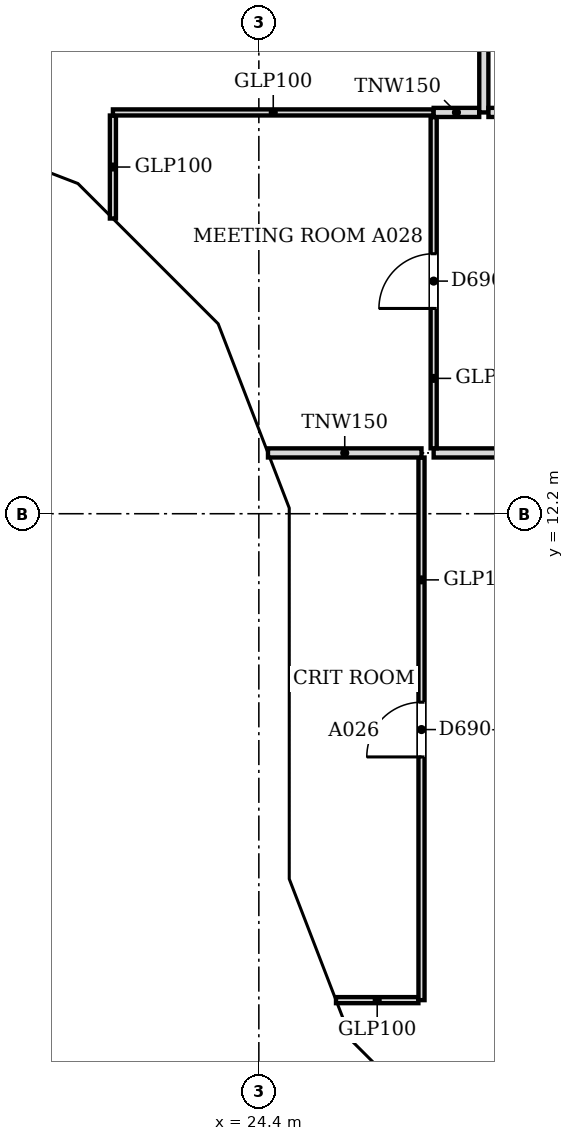
"""IFC4 building model, lengths in metres.
Left out: names, types, materials, properties, quantities, classifications, styles, units other than length and angle.
Written with IfcOpenShell. Run it as: python <this file> out.ifc"""

import sys

from ifc_helpers import new_model, si_unit, direction, frame, frame_2d, origin, place, context, subcontext, project, spatial, polyline, rectangle, outline, extrude, faceted_brep, source, transform, mapped, element, fill, save


model = new_model("IFC4")
c1 = context("Model", 3, precision=1e-05, world=origin(), true_north=direction((0.0, 1.0)))
c2 = subcontext(c1, "Body", "Model", "MODEL_VIEW")
j1 = project(units=[si_unit("LENGTHUNIT", "METRE"), si_unit("PLANEANGLEUNIT", "RADIAN")], contexts=[c1])
p1 = place(None, origin())
s1 = spatial("IfcSite", under=j1, at=p1, CompositionType="ELEMENT")
p2 = place(p1, origin())
s2 = spatial("IfcBuilding", under=s1, at=p2, CompositionType="ELEMENT")
p3 = place(p2, frame((0.0, 0.0, 21.3)))
s3 = spatial("IfcBuildingStorey", under=s2, at=p3, CompositionType="ELEMENT", Elevation=21.3)
m1 = source(origin(), c2, "Body", "Brep", [
    faceted_brep([(3.096, -0.25, 8.925), (0.047, -0.25, 4.566), (0.047, -0.25, 4.434), (3.096, -0.25, 0.075), (0.0, 0.25, 4.5), (3.149, 0.25, 9.0), (3.202, 0.25, 8.925), (3.202, 0.25, 0.075), (3.149, 0.25, 0.0), (3.149, -0.0, 0.0), (3.149, -0.0, 9.0), (0.0, 0.0, 4.5)], [[[0, 1, 2, 3]], [[4, 5, 6, 7, 8]], [[8, 7, 9]], [[6, 5, 10]], [[5, 4, 11, 1, 0, 10]], [[4, 8, 9, 3, 2, 11]], [[11, 2, 1]], [[3, 9, 7, 6, 10, 0]]]),
])
p4 = place(p3, frame((18.346, 18.55, -4.5), z_axis=(0.0, 0.0, 1.0), x_axis=(0.932985567668, -0.359913782069, 0.0)))
e1 = element("IfcWall", 1, at=p4, inside=s3, PredefinedType="SOLIDWALL", context=c2, shape_type="MappedRepresentation", body=[
    mapped(m1, transform((0.0, 0.0, 0.0), scale=1.0)),
])
m2 = source(origin(), c2, "Body", "SweptSolid", [
    extrude(outline(polyline([(2.949, 8.278), (0.305, 4.5), (2.949, 0.722), (2.949, 8.278)])), frame((0.0, 0.26, 0.0), z_axis=(0.0, -1.0, 0.0), x_axis=(1.0, 0.0, 0.0)), (0.0, 0.0, 1.0), 0.52),
])
p5 = place(p4, origin())
e2 = element("IfcOpeningElement", 2, at=p5, cuts=e1, PredefinedType="OPENING", context=c2, shape_type="MappedRepresentation", body=[
    mapped(m2, transform((0.0, 0.0, 0.0), scale=1.0)),
])
m3 = source(origin(), c2, "Body", "Brep", [
    faceted_brep([(0.106, -0.25, 0.075), (3.156, -0.25, 4.425), (3.156, -0.25, 4.575), (0.106, -0.25, 8.925), (0.0, 0.25, 8.924), (0.053, 0.25, 9.0), (3.209, 0.25, 4.5), (0.053, 0.25, 0.0), (0.0, 0.25, 0.076), (3.209, -0.0, 4.5), (0.053, 0.0, 0.0), (0.053, 0.0, 9.0)], [[[0, 1, 2, 3]], [[4, 5, 6, 7, 8]], [[7, 6, 9, 1, 0, 10]], [[6, 5, 11, 3, 2, 9]], [[5, 4, 11]], [[8, 7, 10]], [[8, 10, 0, 3, 11, 4]], [[1, 9, 2]]]),
])
p6 = place(p3, frame((21.248, 17.454, -4.5), z_axis=(0.0, 0.0, 1.0), x_axis=(0.707106781187, -0.707106781187, 0.0)))
e3 = element("IfcWall", 3, at=p6, inside=s3, PredefinedType="SOLIDWALL", context=c2, shape_type="MappedRepresentation", body=[
    mapped(m3, transform((0.0, 0.0, 0.0), scale=1.0)),
])
m4 = source(origin(), c2, "Body", "SweptSolid", [
    extrude(outline(polyline([(0.253, 0.72), (2.904, 4.5), (0.253, 8.279), (0.253, 0.72)])), frame((0.0, 0.26, 0.0), z_axis=(0.0, -1.0, 0.0), x_axis=(1.0, 0.0, 0.0)), (0.0, 0.0, 1.0), 0.52),
])
p7 = place(p6, origin())
e4 = element("IfcOpeningElement", 4, at=p7, cuts=e3, PredefinedType="OPENING", context=c2, shape_type="MappedRepresentation", body=[
    mapped(m4, transform((0.0, 0.0, 0.0), scale=1.0)),
])
m5 = source(origin(), c2, "Body", "Brep", [
    faceted_brep([(3.103, -0.25, 8.934), (0.053, -0.25, 4.576), (0.053, -0.25, 4.424), (3.103, -0.25, 0.066), (0.0, 0.25, 4.5), (3.149, 0.25, 9.0), (3.196, 0.25, 8.932), (3.196, 0.25, 0.068), (3.149, 0.25, 0.0), (3.149, -0.0, 0.0), (3.149, -0.0, 9.0), (0.0, 0.0, 4.5)], [[[0, 1, 2, 3]], [[4, 5, 6, 7, 8]], [[8, 7, 9]], [[6, 5, 10]], [[5, 4, 11, 1, 0, 10]], [[4, 8, 9, 3, 2, 11]], [[11, 2, 1]], [[3, 9, 7, 6, 10, 0]]]),
])
p8 = place(p3, frame((23.517, 15.185, -4.5), z_axis=(0.0, 0.0, 1.0), x_axis=(0.359864468756, -0.933004589553, 0.0)))
e5 = element("IfcWall", 5, at=p8, inside=s3, PredefinedType="SOLIDWALL", context=c2, shape_type="MappedRepresentation", body=[
    mapped(m5, transform((0.0, 0.0, 0.0), scale=1.0)),
])
p9 = place(p8, origin())
e6 = element("IfcOpeningElement", 6, at=p9, cuts=e5, PredefinedType="OPENING", context=c2, shape_type="MappedRepresentation", body=[
    mapped(m2, transform((0.0, 0.0, 0.0), scale=1.0)),
])
m6 = source(origin(), c2, "Body", "Brep", [
    faceted_brep([(0.093, -0.25, 0.068), (3.143, -0.25, 4.5), (0.093, -0.25, 8.932), (0.0, 0.25, 8.934), (0.047, 0.25, 9.0), (3.143, 0.25, 4.5), (0.047, 0.25, 0.0), (0.0, 0.25, 0.066), (0.047, 0.0, 0.0), (0.047, 0.0, 9.0)], [[[0, 1, 2]], [[3, 4, 5, 6, 7]], [[6, 5, 1, 0, 8]], [[5, 4, 9, 2, 1]], [[4, 3, 9]], [[7, 6, 8]], [[7, 8, 0, 2, 9, 3]]]),
])
p10 = place(p3, frame((24.65, 12.293, -4.5), z_axis=(0.0, 0.0, 1.0), x_axis=(0.0, -1.0, 0.0)))
e7 = element("IfcWall", 7, at=p10, inside=s3, PredefinedType="SOLIDWALL", context=c2, shape_type="MappedRepresentation", body=[
    mapped(m6, transform((0.0, 0.0, 0.0), scale=1.0)),
])
m7 = source(origin(), c2, "Body", "SweptSolid", [
    extrude(outline(polyline([(0.247, 0.732), (2.84, 4.5), (0.247, 8.268), (0.247, 0.732)])), frame((0.0, 0.26, 0.0), z_axis=(0.0, -1.0, 0.0), x_axis=(1.0, 0.0, 0.0)), (0.0, 0.0, 1.0), 0.52),
])
p11 = place(p10, origin())
e8 = element("IfcOpeningElement", 8, at=p11, cuts=e7, PredefinedType="OPENING", context=c2, shape_type="MappedRepresentation", body=[
    mapped(m7, transform((0.0, 0.0, 0.0), scale=1.0)),
])
m8 = source(origin(), c2, "Body", "Brep", [
    faceted_brep([(3.003, -0.25, 0.0), (3.05, -0.25, 0.071), (3.05, -0.25, 8.929), (3.003, -0.25, 9.0), (0.0, -0.25, 4.5), (0.0, 0.25, 4.5), (2.957, 0.25, 8.93), (2.957, 0.25, 0.07), (3.003, 0.0, 0.0), (3.003, 0.0, 9.0)], [[[0, 1, 2, 3, 4]], [[5, 6, 7]], [[1, 0, 8]], [[9, 3, 2]], [[6, 5, 4, 3, 9]], [[5, 7, 8, 0, 4]], [[1, 8, 7, 6, 9, 2]]]),
])
p12 = place(p3, frame((24.65, 9.15, -4.5), z_axis=(0.0, 0.0, 1.0), x_axis=(0.0, -1.0, 0.0)))
e9 = element("IfcWall", 9, at=p12, inside=s3, PredefinedType="SOLIDWALL", context=c2, shape_type="MappedRepresentation", body=[
    mapped(m8, transform((0.0, 0.0, 0.0), scale=1.0)),
])
m9 = source(origin(), c2, "Body", "SweptSolid", [
    extrude(outline(polyline([(2.803, 8.25), (0.301, 4.5), (2.803, 0.75), (2.803, 8.25)])), frame((0.0, 0.26, 0.0), z_axis=(0.0, -1.0, 0.0), x_axis=(1.0, 0.0, 0.0)), (0.0, 0.0, 1.0), 0.52),
])
p13 = place(p12, origin())
e10 = element("IfcOpeningElement", 10, at=p13, cuts=e9, PredefinedType="OPENING", context=c2, shape_type="MappedRepresentation", body=[
    mapped(m9, transform((0.0, 0.0, 0.0), scale=1.0)),
])
m10 = source(origin(), c2, "Body", "Brep", [
    faceted_brep([(0.047, -0.25, 0.0), (2.997, -0.25, 4.5), (0.047, -0.25, 9.0), (0.0, -0.25, 8.93), (0.0, -0.25, 0.07), (0.093, 0.25, 8.929), (2.944, 0.25, 4.581), (2.944, 0.25, 4.419), (0.093, 0.25, 0.071), (2.997, 0.0, 4.5), (0.047, 0.0, 0.0), (0.047, 0.0, 9.0)], [[[0, 1, 2, 3, 4]], [[5, 6, 7, 8]], [[8, 7, 9, 1, 0, 10]], [[6, 5, 11, 2, 1, 9]], [[3, 2, 11]], [[10, 0, 4]], [[8, 10, 4, 3, 11, 5]], [[9, 7, 6]]]),
])
p14 = place(p3, frame((24.633, 6.19, -4.5), z_axis=(0.0, 0.0, 1.0), x_axis=(0.359901446078, -0.932990326376, 0.0)))
e11 = element("IfcWall", 11, at=p14, inside=s3, PredefinedType="SOLIDWALL", context=c2, shape_type="MappedRepresentation", body=[
    mapped(m10, transform((0.0, 0.0, 0.0), scale=1.0)),
])
m11 = source(origin(), c2, "Body", "SweptSolid", [
    extrude(outline(polyline([(0.247, 0.761), (2.698, 4.5), (0.247, 8.239), (0.247, 0.761)])), frame((0.0, 0.26, 0.0), z_axis=(0.0, -1.0, 0.0), x_axis=(1.0, 0.0, 0.0)), (0.0, 0.0, 1.0), 0.52),
])
p15 = place(p14, origin())
e12 = element("IfcOpeningElement", 12, at=p15, cuts=e11, PredefinedType="OPENING", context=c2, shape_type="MappedRepresentation", body=[
    mapped(m11, transform((0.0, 0.0, 0.0), scale=1.0)),
])
m12 = source(origin(), c2, "Body", "Brep", [
    faceted_brep([(2.944, -0.25, 0.0), (2.997, -0.25, 0.081), (2.997, -0.25, 8.919), (2.944, -0.25, 9.0), (0.0, -0.25, 4.5), (0.053, 0.25, 4.581), (2.891, 0.25, 8.919), (2.891, 0.25, 0.081), (0.053, 0.25, 4.419), (2.944, 0.0, 0.0), (2.944, 0.0, 9.0), (0.0, 0.0, 4.5)], [[[0, 1, 2, 3, 4]], [[5, 6, 7, 8]], [[1, 0, 9]], [[10, 3, 2]], [[6, 5, 11, 4, 3, 10]], [[8, 7, 9, 0, 4, 11]], [[8, 11, 5]], [[1, 9, 7, 6, 10, 2]]]),
])
p16 = place(p3, frame((25.712, 3.394, -4.5), z_axis=(0.0, 0.0, 1.0), x_axis=(0.707066050402, -0.707147509625, 0.0)))
e13 = element("IfcWall", 13, at=p16, inside=s3, PredefinedType="SOLIDWALL", context=c2, shape_type="MappedRepresentation", body=[
    mapped(m12, transform((0.0, 0.0, 0.0), scale=1.0)),
])
m13 = source(origin(), c2, "Body", "SweptSolid", [
    extrude(outline(polyline([(2.744, 8.238), (0.299, 4.5), (2.744, 0.762), (2.744, 8.238)])), frame((0.0, 0.26, 0.0), z_axis=(0.0, -1.0, 0.0), x_axis=(1.0, 0.0, 0.0)), (0.0, 0.0, 1.0), 0.52),
])
p17 = place(p16, origin())
e14 = element("IfcOpeningElement", 14, at=p17, cuts=e13, PredefinedType="OPENING", context=c2, shape_type="MappedRepresentation", body=[
    mapped(m13, transform((0.0, 0.0, 0.0), scale=1.0)),
])
m14 = source(origin(), c2, "Body", "Brep", [
    faceted_brep([(0.093, -0.25, 0.066), (3.143, -0.25, 4.425), (3.143, -0.25, 4.5), (0.093, -0.25, 4.5), (0.0, 0.25, 4.5), (3.196, 0.25, 4.5), (0.047, 0.25, 0.0), (0.0, 0.25, 0.068), (3.196, -0.0, 4.5), (0.047, 0.0, 0.0)], [[[0, 1, 2, 3]], [[4, 5, 6, 7]], [[6, 5, 8, 1, 0, 9]], [[5, 4, 3, 2, 8]], [[7, 6, 9]], [[7, 9, 0, 3, 4]], [[1, 8, 2]]]),
])
p18 = place(p3, frame((18.303, 18.567, 0.0), z_axis=(0.0, 0.0, 1.0), x_axis=(0.932978940178, -0.359930961693, 0.0)))
e15 = element("IfcWall", 15, at=p18, inside=s3, PredefinedType="SOLIDWALL", context=c2, shape_type="MappedRepresentation", body=[
    mapped(m14, transform((0.0, 0.0, 0.0), scale=1.0)),
])
m15 = source(origin(), c2, "Body", "SweptSolid", [
    extrude(outline(polyline([(0.247, 0.722), (2.716, 4.25), (0.247, 4.25), (0.247, 0.722)])), frame((0.0, 0.26, 0.0), z_axis=(0.0, -1.0, 0.0), x_axis=(1.0, 0.0, 0.0)), (0.0, 0.0, 1.0), 0.52),
])
p19 = place(p18, origin())
e16 = element("IfcOpeningElement", 16, at=p19, cuts=e15, PredefinedType="OPENING", context=c2, shape_type="MappedRepresentation", body=[
    mapped(m15, transform((0.0, 0.0, 0.0), scale=1.0)),
])
m16 = source(origin(), c2, "Body", "Brep", [
    faceted_brep([(3.103, -0.25, 4.5), (0.053, -0.25, 4.5), (0.053, -0.25, 4.425), (3.103, -0.25, 0.075), (0.0, 0.25, 4.5), (3.209, 0.25, 4.5), (3.209, 0.25, 0.076), (3.156, 0.25, 0.0), (3.156, -0.0, 0.0), (0.0, 0.0, 4.5)], [[[0, 1, 2, 3]], [[4, 5, 6, 7]], [[7, 6, 8]], [[5, 4, 9, 1, 0]], [[4, 7, 8, 3, 2, 9]], [[2, 1, 9]], [[3, 8, 6, 5, 0]]]),
])
p20 = place(p3, frame((21.285, 17.417, 0.0), z_axis=(0.0, 0.0, 1.0), x_axis=(0.707106781187, -0.707106781187, 0.0)))
e17 = element("IfcWall", 17, at=p20, inside=s3, PredefinedType="SOLIDWALL", context=c2, shape_type="MappedRepresentation", body=[
    mapped(m16, transform((0.0, 0.0, 0.0), scale=1.0)),
])
m17 = source(origin(), c2, "Body", "SweptSolid", [
    extrude(outline(polyline([(2.956, 4.25), (0.481, 4.25), (2.956, 0.72), (2.956, 4.25)])), frame((0.0, 0.26, 0.0), z_axis=(0.0, -1.0, 0.0), x_axis=(1.0, 0.0, 0.0)), (0.0, 0.0, 1.0), 0.52),
])
p21 = place(p20, origin())
e18 = element("IfcOpeningElement", 18, at=p21, cuts=e17, PredefinedType="OPENING", context=c2, shape_type="MappedRepresentation", body=[
    mapped(m17, transform((0.0, 0.0, 0.0), scale=1.0)),
])
m18 = source(origin(), c2, "Body", "Brep", [
    faceted_brep([(0.106, -0.25, 0.076), (3.156, -0.25, 4.434), (3.156, -0.25, 4.5), (0.106, -0.25, 4.5), (0.0, 0.25, 4.5), (3.202, 0.25, 4.5), (0.053, 0.25, 0.0), (0.0, 0.25, 0.075), (3.202, -0.0, 4.5), (0.053, 0.0, 0.0)], [[[0, 1, 2, 3]], [[4, 5, 6, 7]], [[6, 5, 8, 1, 0, 9]], [[5, 4, 3, 2, 8]], [[7, 6, 9]], [[7, 9, 0, 3, 4]], [[1, 8, 2]]]),
])
p22 = place(p3, frame((23.497, 15.234, 0.0), z_axis=(0.0, 0.0, 1.0), x_axis=(0.359913782069, -0.932985567668, 0.0)))
e19 = element("IfcWall", 19, at=p22, inside=s3, PredefinedType="SOLIDWALL", context=c2, shape_type="MappedRepresentation", body=[
    mapped(m18, transform((0.0, 0.0, 0.0), scale=1.0)),
])
m19 = source(origin(), c2, "Body", "SweptSolid", [
    extrude(outline(polyline([(0.253, 0.722), (2.722, 4.25), (0.253, 4.25), (0.253, 0.722)])), frame((0.0, 0.26, 0.0), z_axis=(0.0, -1.0, 0.0), x_axis=(1.0, 0.0, 0.0)), (0.0, 0.0, 1.0), 0.52),
])
p23 = place(p22, origin())
e20 = element("IfcOpeningElement", 20, at=p23, cuts=e19, PredefinedType="OPENING", context=c2, shape_type="MappedRepresentation", body=[
    mapped(m19, transform((0.0, 0.0, 0.0), scale=1.0)),
])
m20 = source(origin(), c2, "Body", "Brep", [
    faceted_brep([(3.096, -0.25, 0.0), (6.1, -0.25, 4.5), (0.047, -0.25, 4.5), (0.047, -0.25, 4.432), (0.0, 0.25, 4.5), (6.053, 0.25, 4.5), (6.053, 0.25, 4.43), (3.096, 0.25, 0.0), (6.1, -0.0, 4.5), (0.0, 0.0, 4.5)], [[[0, 1, 2, 3]], [[4, 5, 6, 7]], [[7, 6, 8, 1, 0]], [[5, 4, 9, 2, 1, 8]], [[4, 7, 0, 3, 9]], [[3, 2, 9]], [[6, 5, 8]]]),
])
p24 = place(p3, frame((24.65, 12.247, 0.0), z_axis=(0.0, 0.0, 1.0), x_axis=(0.0, -1.0, 0.0)))
e21 = element("IfcWall", 21, at=p24, inside=s3, PredefinedType="SOLIDWALL", context=c2, shape_type="MappedRepresentation", body=[
    mapped(m20, transform((0.0, 0.0, 0.0), scale=1.0)),
])
m21 = source(origin(), c2, "Body", "SweptSolid", [
    extrude(outline(polyline([(3.094, 0.446), (5.633, 4.25), (0.476, 4.25), (3.094, 0.446)])), frame((0.0, 0.26, 0.0), z_axis=(0.0, -1.0, 0.0), x_axis=(1.0, 0.0, 0.0)), (0.0, 0.0, 1.0), 0.52),
])
p25 = place(p24, origin())
e22 = element("IfcOpeningElement", 22, at=p25, cuts=e21, PredefinedType="OPENING", context=c2, shape_type="MappedRepresentation", body=[
    mapped(m21, transform((0.0, 0.0, 0.0), scale=1.0)),
])
m22 = source(origin(), c2, "Body", "Brep", [
    faceted_brep([(2.95, -0.25, 0.0), (3.003, -0.25, 0.081), (3.003, -0.25, 4.5), (0.0, -0.25, 4.5), (0.047, 0.25, 4.5), (2.898, 0.25, 4.5), (2.898, 0.25, 0.081), (0.047, 0.25, 4.429), (2.95, 0.0, 0.0), (0.0, 0.0, 4.5)], [[[0, 1, 2, 3]], [[4, 5, 6, 7]], [[1, 0, 8]], [[5, 4, 9, 3, 2]], [[7, 6, 8, 0, 3, 9]], [[7, 9, 4]], [[1, 8, 6, 5, 2]]]),
])
p26 = place(p3, frame((24.65, 6.146, 0.0), z_axis=(0.0, 0.0, 1.0), x_axis=(0.359953949349, -0.932970071518, 0.0)))
e23 = element("IfcWall", 23, at=p26, inside=s3, PredefinedType="SOLIDWALL", context=c2, shape_type="MappedRepresentation", body=[
    mapped(m22, transform((0.0, 0.0, 0.0), scale=1.0)),
])
m23 = source(origin(), c2, "Body", "SweptSolid", [
    extrude(outline(polyline([(2.75, 4.25), (0.463, 4.25), (2.75, 0.761), (2.75, 4.25)])), frame((0.0, 0.26, 0.0), z_axis=(0.0, -1.0, 0.0), x_axis=(1.0, 0.0, 0.0)), (0.0, 0.0, 1.0), 0.52),
])
p27 = place(p26, origin())
e24 = element("IfcOpeningElement", 24, at=p27, cuts=e23, PredefinedType="OPENING", context=c2, shape_type="MappedRepresentation", body=[
    mapped(m23, transform((0.0, 0.0, 0.0), scale=1.0)),
])
m24 = source(origin(), c2, "Body", "Brep", [
    faceted_brep([(0.053, -0.25, 0.0), (2.997, -0.25, 4.5), (0.0, -0.25, 4.5), (0.0, -0.25, 0.081), (0.106, 0.25, 4.5), (2.944, 0.25, 4.5), (2.944, 0.25, 4.419), (0.106, 0.25, 0.081), (2.997, 0.0, 4.5), (0.053, 0.0, 0.0)], [[[0, 1, 2, 3]], [[4, 5, 6, 7]], [[7, 6, 8, 1, 0, 9]], [[5, 4, 2, 1, 8]], [[9, 0, 3]], [[7, 9, 3, 2, 4]], [[6, 5, 8]]]),
])
p28 = place(p3, frame((25.675, 3.431, 0.0), z_axis=(0.0, 0.0, 1.0), x_axis=(0.707106781187, -0.707106781187, 0.0)))
e25 = element("IfcWall", 25, at=p28, inside=s3, PredefinedType="SOLIDWALL", context=c2, shape_type="MappedRepresentation", body=[
    mapped(m24, transform((0.0, 0.0, 0.0), scale=1.0)),
])
m25 = source(origin(), c2, "Body", "SweptSolid", [
    extrude(outline(polyline([(0.253, 0.762), (2.535, 4.25), (0.253, 4.25), (0.253, 0.762)])), frame((0.0, 0.26, 0.0), z_axis=(0.0, -1.0, 0.0), x_axis=(1.0, 0.0, 0.0)), (0.0, 0.0, 1.0), 0.52),
])
p29 = place(p28, origin())
e26 = element("IfcOpeningElement", 26, at=p29, cuts=e25, PredefinedType="OPENING", context=c2, shape_type="MappedRepresentation", body=[
    mapped(m25, transform((0.0, 0.0, 0.0), scale=1.0)),
])
p30 = place(p3, frame((25.669, 4.2, 0.0), z_axis=(0.0, 0.0, 1.0), x_axis=(1.0, 0.0, 0.0)))
e27 = element("IfcWall", 27, at=p30, inside=s3, PredefinedType="PARTITIONING", context=c2, shape_type="SweptSolid", body=[
    extrude(rectangle(XDim=1.355, YDim=0.1, at=frame_2d((0.678, 0.0))), origin(), (0.0, 0.0, 1.0), 3.767),
])
p31 = place(p3, frame((27.075, 4.2, 0.0), z_axis=(0.0, 0.0, 1.0), x_axis=(0.0, 1.0, 0.0)))
e28 = element("IfcWall", 28, at=p31, inside=s3, PredefinedType="PARTITIONING", context=c2, shape_type="SweptSolid", body=[
    extrude(rectangle(XDim=8.924, YDim=0.1, at=frame_2d((4.462, 0.0))), origin(), (0.0, 0.0, 1.0), 3.767),
])
m26 = source(origin(), c2, "Body", "SweptSolid", [
    extrude(rectangle(XDim=0.9, YDim=2.1, at=frame_2d((0.45, 1.05))), frame((0.0, 0.06, 0.0), z_axis=(0.0, -1.0, 0.0), x_axis=(1.0, 0.0, 0.0)), (0.0, 0.0, 1.0), 0.12),
])
p32 = place(p31, frame((4.0, 0.0, 0.0)))
e29 = element("IfcOpeningElement", 29, at=p32, cuts=e28, PredefinedType="OPENING", context=c2, shape_type="MappedRepresentation", body=[
    mapped(m26, transform((0.0, 0.0, 0.0), scale=1.0)),
])
p33 = place(p3, frame((24.55, 13.2, 0.0), z_axis=(0.0, 0.0, 1.0), x_axis=(1.0, 0.0, 0.0)))
e30 = element("IfcWall", 30, at=p33, inside=s3, PredefinedType="PARTITIONING", context=c2, shape_type="SweptSolid", body=[
    extrude(rectangle(XDim=2.525, YDim=0.15, at=frame_2d((1.262, 0.0))), origin(), (0.0, 0.0, 1.0), 3.767),
])
p34 = place(p3, frame((27.275, 13.2, 0.0), z_axis=(0.0, 0.0, 1.0), x_axis=(1.0, 0.0, 0.0)))
e31 = element("IfcWall", 31, at=p34, inside=s3, PredefinedType="PARTITIONING", context=c2, shape_type="SweptSolid", body=[
    extrude(rectangle(XDim=15.649, YDim=0.15, at=frame_2d((7.825, 0.0))), origin(), (0.0, 0.0, 1.0), 3.767),
])
p35 = place(p3, frame((27.275, 13.276, 0.0), z_axis=(0.0, 0.0, 1.0), x_axis=(0.0, 1.0, 0.0)))
e32 = element("IfcWall", 32, at=p35, inside=s3, PredefinedType="PARTITIONING", context=c2, shape_type="SweptSolid", body=[
    extrude(rectangle(XDim=5.448, YDim=0.1, at=frame_2d((2.724, 0.0))), origin(), (0.0, 0.0, 1.0), 3.767),
])
p36 = place(p35, frame((2.3, 0.0, 0.0)))
e33 = element("IfcOpeningElement", 33, at=p36, cuts=e32, PredefinedType="OPENING", context=c2, shape_type="MappedRepresentation", body=[
    mapped(m26, transform((0.0, 0.0, 0.0), scale=1.0)),
])
p37 = place(p3, frame((22.0, 17.055, 0.0), z_axis=(0.0, 0.0, 1.0), x_axis=(0.0, 1.0, 0.0)))
e34 = element("IfcWall", 34, at=p37, inside=s3, PredefinedType="PARTITIONING", context=c2, shape_type="SweptSolid", body=[
    extrude(rectangle(XDim=1.694, YDim=0.1, at=frame_2d((0.847, 0.0))), origin(), (0.0, 0.0, 1.0), 3.767),
])
p38 = place(p3, frame((22.0, 18.8, 0.0), z_axis=(0.0, 0.0, 1.0), x_axis=(1.0, 0.0, 0.0)))
e35 = element("IfcWall", 35, at=p38, inside=s3, PredefinedType="PARTITIONING", context=c2, shape_type="SweptSolid", body=[
    extrude(rectangle(XDim=5.274, YDim=0.1, at=frame_2d((2.637, 0.0))), origin(), (0.0, 0.0, 1.0), 3.767),
])
p39 = place(p3, frame((27.275, 18.8, 0.0), z_axis=(0.0, 0.0, 1.0), x_axis=(1.0, 0.0, 0.0)))
e36 = element("IfcWall", 36, at=p39, inside=s3, PredefinedType="PARTITIONING", context=c2, shape_type="SweptSolid", body=[
    extrude(rectangle(XDim=0.749, YDim=0.15, at=frame_2d((0.375, 0.0))), origin(), (0.0, 0.0, 1.0), 3.767),
])
p40 = place(p3, frame((28.1, 18.8, 0.0), z_axis=(0.0, 0.0, 1.0), x_axis=(0.0, 1.0, 0.0)))
e37 = element("IfcWall", 37, at=p40, inside=s3, PredefinedType="PARTITIONING", context=c2, shape_type="SweptSolid", body=[
    extrude(rectangle(XDim=26.424, YDim=0.15, at=frame_2d((13.212, 0.0))), origin(), (0.0, 0.0, 1.0), 3.767),
])
m27 = source(origin(), c2, "Body", "SweptSolid", [
    extrude(rectangle(XDim=0.9, YDim=2.1, at=frame_2d((0.45, 1.05))), frame((0.0, 0.085, 0.0), z_axis=(0.0, -1.0, 0.0), x_axis=(1.0, 0.0, 0.0)), (0.0, 0.0, 1.0), 0.17),
])
p41 = place(p40, frame((3.901, 0.0, 0.0)))
e38 = element("IfcOpeningElement", 38, at=p41, cuts=e37, PredefinedType="OPENING", context=c2, shape_type="MappedRepresentation", body=[
    mapped(m27, transform((0.0, 0.0, 0.0), scale=1.0)),
])
p42 = place(p40, frame((23.451, 0.0, 0.0)))
e39 = element("IfcOpeningElement", 39, at=p42, cuts=e37, PredefinedType="OPENING", context=c2, shape_type="MappedRepresentation", body=[
    mapped(m27, transform((0.0, 0.0, 0.0), scale=1.0)),
])
m28 = source(origin(), c2, "Body", "SweptSolid", [
    extrude(rectangle(XDim=1.0, YDim=2.1, at=frame_2d((0.5, 1.05))), frame((0.0, 0.085, 0.0), z_axis=(0.0, -1.0, 0.0), x_axis=(1.0, 0.0, 0.0)), (0.0, 0.0, 1.0), 0.17),
])
p43 = place(p40, frame((8.4, 0.0, 0.0)))
e40 = element("IfcOpeningElement", 40, at=p43, cuts=e37, PredefinedType="OPENING", context=c2, shape_type="MappedRepresentation", body=[
    mapped(m28, transform((0.0, 0.0, 0.0), scale=1.0)),
])
p44 = place(p40, frame((16.3, 0.0, 0.0)))
e41 = element("IfcOpeningElement", 41, at=p44, cuts=e37, PredefinedType="OPENING", context=c2, shape_type="MappedRepresentation", body=[
    mapped(m27, transform((0.0, 0.0, 0.0), scale=1.0)),
])
p45 = place(p3, frame((28.176, 18.8, 0.0), z_axis=(0.0, 0.0, 1.0), x_axis=(1.0, 0.0, 0.0)))
e42 = element("IfcWall", 42, at=p45, inside=s3, PredefinedType="PARTITIONING", context=c2, shape_type="SweptSolid", body=[
    extrude(rectangle(XDim=2.248, YDim=0.15, at=frame_2d((1.124, 0.0))), origin(), (0.0, 0.0, 1.0), 3.767),
])
m29 = source(origin(), c2, "Body", "SweptSolid", [
    extrude(rectangle(XDim=0.9, YDim=2.1, at=frame_2d((0.45, 1.05))), frame((0.0, 0.025, 0.0), z_axis=(0.0, -1.0, 0.0), x_axis=(1.0, 0.0, 0.0)), (0.0, 0.0, 1.0), 0.05),
])
p46 = place(p36, origin())
e43 = element("IfcDoor", 43, at=p46, inside=s3, OperationType="SINGLE_SWING_LEFT", PredefinedType="DOOR", context=c2, shape_type="MappedRepresentation", body=[
    mapped(m29, transform((0.0, 0.0, 0.0), scale=1.0)),
])
fill(e33, e43)
p47 = place(p32, origin())
e44 = element("IfcDoor", 44, at=p47, inside=s3, OperationType="SINGLE_SWING_LEFT", PredefinedType="DOOR", context=c2, shape_type="MappedRepresentation", body=[
    mapped(m29, transform((0.0, 0.0, 0.0), scale=1.0)),
])
fill(e29, e44)
save(model, sys.argv[1])
